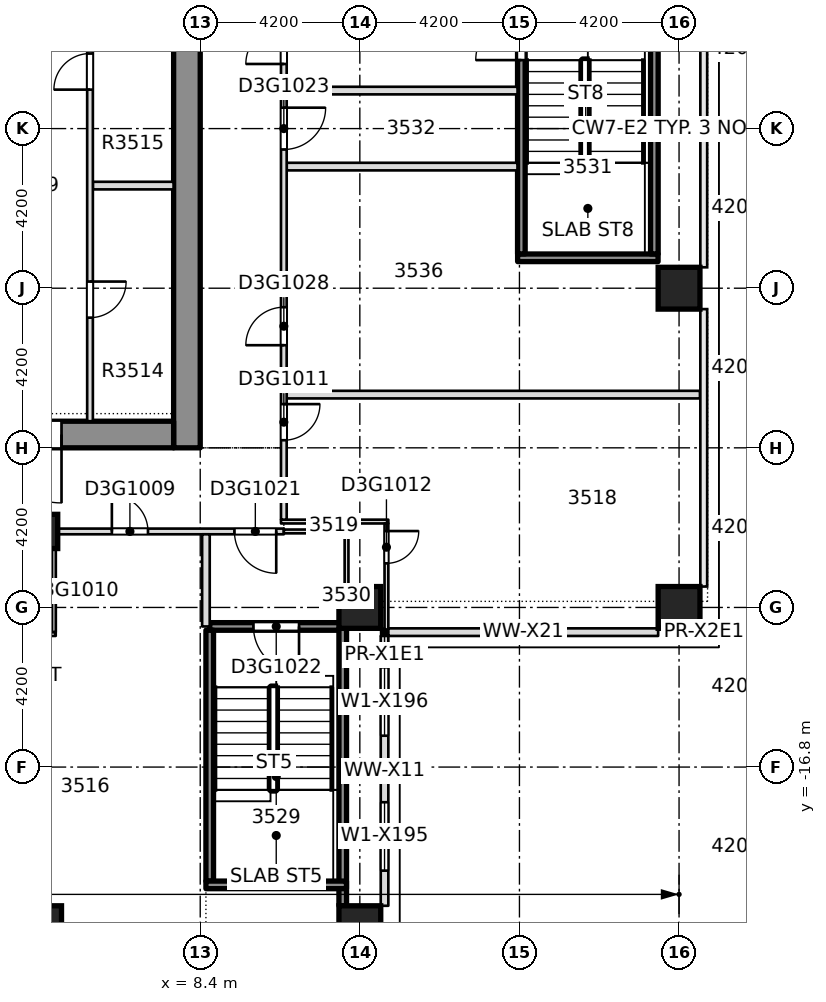
"""IFC4 building model, lengths in metres.
Left out: names, types, materials, properties, quantities, classifications, styles, units other than length and angle.
Written with IfcOpenShell. Run it as: python <this file> out.ifc"""

import sys

from ifc_helpers import new_model, si_unit, direction, frame, frame_2d, origin, origin_2d, place, context, subcontext, project, spatial, rectangle, extrude, element, fill, save


model = new_model("IFC4")
c1 = context("Model", 3, precision=1e-05, world=origin(), true_north=direction((0.0, 1.0)))
c2 = subcontext(c1, "Body", "Model", "MODEL_VIEW")
j1 = project(units=[si_unit("LENGTHUNIT", "METRE"), si_unit("PLANEANGLEUNIT", "RADIAN")], contexts=[c1])
p1 = place(None, origin())
s1 = spatial("IfcSite", under=j1, at=p1, CompositionType="ELEMENT")
p2 = place(p1, origin())
s2 = spatial("IfcBuilding", under=s1, at=p2, CompositionType="ELEMENT")
p3 = place(p2, frame((0.0, 0.0, 140.0)))
s3 = spatial("IfcBuildingStorey", under=s2, at=p3, CompositionType="ELEMENT", Elevation=140.0)
p4 = place(p3, frame((8.05, -8.4, -0.4), z_axis=(0.0, 0.0, 1.0), x_axis=(0.0, 1.0, 0.0)))
e1 = element("IfcWall", 1, at=p4, inside=s3, PredefinedType="SOLIDWALL", context=c2, shape_type="SweptSolid", body=[
    extrude(rectangle(XDim=30.15, YDim=0.7, at=frame_2d((15.075, 0.0))), origin(), (0.0, 0.0, 1.0), 3.45),
])
p5 = place(p4, frame((19.3, 0.0, 0.4)))
e2 = element("IfcOpeningElement", 2, at=p5, cuts=e1, PredefinedType="OPENING", context=c2, shape_type="SweptSolid", body=[
    extrude(rectangle(XDim=1.2, YDim=2.1, at=frame_2d((0.6, 1.05))), frame((0.0, 0.36, 0.0), z_axis=(0.0, -1.0, 0.0), x_axis=(1.0, 0.0, 0.0)), (0.0, 0.0, 1.0), 0.72),
])
p6 = place(p3, frame((-7.7, -8.05, -0.4), z_axis=(0.0, 0.0, 1.0), x_axis=(1.0, 0.0, 0.0)))
e3 = element("IfcWall", 3, at=p6, inside=s3, PredefinedType="SHEAR", context=c2, shape_type="SweptSolid", body=[
    extrude(rectangle(XDim=15.4, YDim=0.7, at=frame_2d((7.7, 0.0))), origin(), (0.0, 0.0, 1.0), 3.45),
])
p7 = place(p6, frame((2.95, 0.0, 0.4)))
e4 = element("IfcOpeningElement", 4, at=p7, cuts=e3, PredefinedType="OPENING", context=c2, shape_type="SweptSolid", body=[
    extrude(rectangle(XDim=1.8, YDim=2.1, at=frame_2d((0.9, 1.05))), frame((0.0, 0.36, 0.0), z_axis=(0.0, -1.0, 0.0), x_axis=(1.0, 0.0, 0.0)), (0.0, 0.0, 1.0), 0.72),
])
p8 = place(p6, frame((10.65, 0.0, 0.4)))
e5 = element("IfcOpeningElement", 5, at=p8, cuts=e3, PredefinedType="OPENING", context=c2, shape_type="SweptSolid", body=[
    extrude(rectangle(XDim=1.8, YDim=2.1, at=frame_2d((0.9, 1.05))), frame((0.0, 0.36, 0.0), z_axis=(0.0, -1.0, 0.0), x_axis=(1.0, 0.0, 0.0)), (0.0, 0.0, 1.0), 0.72),
])
for number, where, z_axis, x_axis in (
    (6, (4.2, -21.0, -0.4), (0.0, 0.0, 1.0), (1.0, 0.0, 0.0)),
    (7, (12.6, -21.0, -0.4), (0.0, 0.0, 1.0), (1.0, 0.0, 0.0)),
    (8, (12.6, -12.6, -0.4), (0.0, 0.0, 1.0), (1.0, 0.0, 0.0)),
    (9, (21.0, -12.6, -0.4), (0.0, 0.0, 1.0), (1.0, 0.0, 0.0)),
    (10, (21.0, -4.2, -0.4), (0.0, 0.0, 1.0), (1.0, 0.0, 0.0)),
):
    element("IfcColumn", number, at=place(p3, frame(where, z_axis=z_axis, x_axis=x_axis)), inside=s3, PredefinedType="COLUMN", context=c2, shape_type="SweptSolid", body=[
        extrude(rectangle(XDim=1.1, YDim=1.1, at=origin_2d()), origin(), (0.0, 0.0, 1.0), 3.45),
    ])
p9 = place(p3, frame((4.2, -10.6, -0.4), z_axis=(0.0, 0.0, 1.0), x_axis=(1.0, 0.0, 0.0)))
e11 = element("IfcColumn", 11, at=p9, inside=s3, PredefinedType="COLUMN", context=c2, shape_type="SweptSolid", body=[
    extrude(rectangle(XDim=0.9, YDim=0.9, at=origin_2d()), origin(), (0.0, 0.0, 1.0), 3.45),
])
p10 = place(p3, frame((1.802, -13.3, 0.0), z_axis=(0.0, 0.0, 1.0), x_axis=(1.0, 0.0, 0.0)))
e12 = element("IfcWall", 12, at=p10, inside=s3, PredefinedType="PARTITIONING", context=c2, shape_type="SweptSolid", body=[
    extrude(rectangle(XDim=2.796, YDim=0.1, at=frame_2d((1.398, 0.0))), origin(), (0.0, 0.0, 1.0), 3.05),
])
p11 = place(p10, frame((1.698, 0.0, 0.0)))
e13 = element("IfcOpeningElement", 13, at=p11, cuts=e12, PredefinedType="OPENING", context=c2, shape_type="SweptSolid", body=[
    extrude(rectangle(XDim=0.85, YDim=2.1, at=frame_2d((0.425, 1.05))), frame((0.0, 0.06, 0.0), z_axis=(0.0, -1.0, 0.0), x_axis=(1.0, 0.0, 0.0)), (0.0, 0.0, 1.0), 0.12),
])
p12 = place(p3, frame((8.65, -13.1, 0.0), z_axis=(0.0, 0.0, 1.0), x_axis=(1.0, 0.0, 0.0)))
e14 = element("IfcWall", 14, at=p12, inside=s3, PredefinedType="SOLIDWALL", context=c2, shape_type="SweptSolid", body=[
    extrude(rectangle(XDim=3.5, YDim=0.2, at=frame_2d((1.75, 0.0))), origin(), (0.0, 0.0, 1.0), 3.05),
])
p13 = place(p12, frame((1.15, 0.0, 0.0)))
e15 = element("IfcOpeningElement", 15, at=p13, cuts=e14, PredefinedType="OPENING", context=c2, shape_type="SweptSolid", body=[
    extrude(rectangle(XDim=1.2, YDim=2.1, at=frame_2d((0.6, 1.05))), frame((0.0, 0.11, 0.0), z_axis=(0.0, -1.0, 0.0), x_axis=(1.0, 0.0, 0.0)), (0.0, 0.0, 1.0), 0.22),
])
p14 = place(p3, frame((1.8, -10.6, 0.0), z_axis=(0.0, 0.0, 1.0), x_axis=(1.0, 0.0, 0.0)))
e16 = element("IfcWall", 16, at=p14, inside=s3, PredefinedType="PARTITIONING", context=c2, shape_type="SweptSolid", body=[
    extrude(rectangle(XDim=2.8, YDim=0.1, at=frame_2d((1.4, 0.0))), origin(), (0.0, 0.0, 1.0), 3.05),
])
p15 = place(p3, frame((4.5, -10.6, 0.0), z_axis=(0.0, 0.0, 1.0), x_axis=(1.0, 0.0, 0.0)))
e17 = element("IfcWall", 17, at=p15, inside=s3, PredefinedType="PARTITIONING", context=c2, shape_type="SweptSolid", body=[
    extrude(rectangle(XDim=6.1, YDim=0.15, at=frame_2d((3.05, 0.0))), origin(), (0.0, 0.0, 1.0), 3.05),
])
p16 = place(p15, frame((1.575, 0.0, 0.0)))
e18 = element("IfcOpeningElement", 18, at=p16, cuts=e17, PredefinedType="OPENING", context=c2, shape_type="SweptSolid", body=[
    extrude(rectangle(XDim=0.95, YDim=2.1, at=frame_2d((0.475, 1.05))), frame((0.0, 0.085, 0.0), z_axis=(0.0, -1.0, 0.0), x_axis=(1.0, 0.0, 0.0)), (0.0, 0.0, 1.0), 0.17),
])
p17 = place(p15, frame((4.8, 0.0, 0.0)))
e19 = element("IfcOpeningElement", 19, at=p17, cuts=e17, PredefinedType="OPENING", context=c2, shape_type="SweptSolid", body=[
    extrude(rectangle(XDim=1.1, YDim=2.1, at=frame_2d((0.55, 1.05))), frame((0.0, 0.085, 0.0), z_axis=(0.0, -1.0, 0.0), x_axis=(1.0, 0.0, 0.0)), (0.0, 0.0, 1.0), 0.17),
])
p18 = place(p3, frame((10.6, -10.6, 0.0), z_axis=(0.0, 0.0, 1.0), x_axis=(1.0, 0.0, 0.0)))
e20 = element("IfcWall", 20, at=p18, inside=s3, PredefinedType="PARTITIONING", context=c2, shape_type="SweptSolid", body=[
    extrude(rectangle(XDim=1.7, YDim=0.1, at=frame_2d((0.85, 0.0))), origin(), (0.0, 0.0, 1.0), 3.05),
])
p19 = place(p3, frame((10.525, -10.34, 0.0), z_axis=(0.0, 0.0, 1.0), x_axis=(1.0, 0.0, 0.0)))
e21 = element("IfcWall", 21, at=p19, inside=s3, PredefinedType="PARTITIONING", context=c2, shape_type="SweptSolid", body=[
    extrude(rectangle(XDim=2.825, YDim=0.1, at=frame_2d((1.413, 0.0))), origin(), (0.0, 0.0, 1.0), 3.05),
])
p20 = place(p3, frame((10.675, -7.0, 0.0), z_axis=(0.0, 0.0, 1.0), x_axis=(1.0, 0.0, 0.0)))
e22 = element("IfcWall", 22, at=p20, inside=s3, PredefinedType="PARTITIONING", context=c2, shape_type="SweptSolid", body=[
    extrude(rectangle(XDim=10.875, YDim=0.2, at=frame_2d((5.438, 0.0))), origin(), (0.0, 0.0, 1.0), 3.05),
])
p21 = place(p3, frame((16.752, -3.4, 0.0), z_axis=(0.0, 0.0, 1.0), x_axis=(1.0, 0.0, 0.0)))
e23 = element("IfcWall", 23, at=p21, inside=s3, PredefinedType="SOLIDWALL", context=c2, shape_type="SweptSolid", body=[
    extrude(rectangle(XDim=3.696, YDim=0.2, at=frame_2d((1.848, 0.0))), origin(), (0.0, 0.0, 1.0), 3.05),
])
p22 = place(p3, frame((10.677, -1.0, 0.0), z_axis=(0.0, 0.0, 1.0), x_axis=(1.0, 0.0, 0.0)))
e24 = element("IfcWall", 24, at=p22, inside=s3, PredefinedType="PARTITIONING", context=c2, shape_type="SweptSolid", body=[
    extrude(rectangle(XDim=6.071, YDim=0.2, at=frame_2d((3.036, 0.0))), origin(), (0.0, 0.0, 1.0), 3.05),
])
p23 = place(p3, frame((10.675, 1.0, 0.0), z_axis=(0.0, 0.0, 1.0), x_axis=(1.0, 0.0, 0.0)))
e25 = element("IfcWall", 25, at=p23, inside=s3, PredefinedType="PARTITIONING", context=c2, shape_type="SweptSolid", body=[
    extrude(rectangle(XDim=6.075, YDim=0.2, at=frame_2d((3.038, 0.0))), origin(), (0.0, 0.0, 1.0), 3.05),
])
p24 = place(p3, frame((4.55, -13.248, 0.0), z_axis=(0.0, 0.0, 1.0), x_axis=(0.0, 1.0, 0.0)))
e26 = element("IfcWall", 26, at=p24, inside=s3, PredefinedType="PARTITIONING", context=c2, shape_type="SweptSolid", body=[
    extrude(rectangle(XDim=2.573, YDim=0.1, at=frame_2d((1.287, 0.0))), origin(), (0.0, 0.0, 1.0), 3.05),
])
p25 = place(p3, frame((8.55, -13.1, 0.0), z_axis=(0.0, 0.0, 1.0), x_axis=(0.0, 1.0, 0.0)))
e27 = element("IfcWall", 27, at=p25, inside=s3, PredefinedType="PARTITIONING", context=c2, shape_type="SweptSolid", body=[
    extrude(rectangle(XDim=2.425, YDim=0.2, at=frame_2d((1.212, 0.0))), origin(), (0.0, 0.0, 1.0), 3.05),
])
p26 = place(p3, frame((10.6, -10.29, 0.0), z_axis=(0.0, 0.0, 1.0), x_axis=(0.0, 1.0, 0.0)))
e28 = element("IfcWall", 28, at=p26, inside=s3, PredefinedType="PARTITIONING", context=c2, shape_type="SweptSolid", body=[
    extrude(rectangle(XDim=13.64, YDim=0.15, at=frame_2d((6.82, 0.0))), origin(), (0.0, 0.0, 1.0), 3.05),
])
p27 = place(p26, frame((2.09, 0.0, 0.0)))
e29 = element("IfcOpeningElement", 29, at=p27, cuts=e28, PredefinedType="OPENING", context=c2, shape_type="SweptSolid", body=[
    extrude(rectangle(XDim=0.95, YDim=2.1, at=frame_2d((0.475, 1.05))), frame((0.0, 0.085, 0.0), z_axis=(0.0, -1.0, 0.0), x_axis=(1.0, 0.0, 0.0)), (0.0, 0.0, 1.0), 0.17),
])
p28 = place(p26, frame((9.74, 0.0, 0.0)))
e30 = element("IfcOpeningElement", 30, at=p28, cuts=e28, PredefinedType="OPENING", context=c2, shape_type="SweptSolid", body=[
    extrude(rectangle(XDim=1.1, YDim=2.1, at=frame_2d((0.55, 1.05))), frame((0.0, 0.085, 0.0), z_axis=(0.0, -1.0, 0.0), x_axis=(1.0, 0.0, 0.0)), (0.0, 0.0, 1.0), 0.17),
])
p29 = place(p26, frame((4.59, 0.0, 0.0)))
e31 = element("IfcOpeningElement", 31, at=p29, cuts=e28, PredefinedType="OPENING", context=c2, shape_type="SweptSolid", body=[
    extrude(rectangle(XDim=1.0, YDim=2.1, at=frame_2d((0.5, 1.05))), frame((0.0, 0.085, 0.0), z_axis=(0.0, -1.0, 0.0), x_axis=(1.0, 0.0, 0.0)), (0.0, 0.0, 1.0), 0.17),
])
p30 = place(p26, frame((11.99, 0.0, 0.0)))
e32 = element("IfcOpeningElement", 32, at=p30, cuts=e28, PredefinedType="OPENING", context=c2, shape_type="SweptSolid", body=[
    extrude(rectangle(XDim=1.0, YDim=2.1, at=frame_2d((0.5, 1.05))), frame((0.0, 0.085, 0.0), z_axis=(0.0, -1.0, 0.0), x_axis=(1.0, 0.0, 0.0)), (0.0, 0.0, 1.0), 0.17),
])
p31 = place(p3, frame((12.25, -12.44, 0.0), z_axis=(0.0, 0.0, 1.0), x_axis=(0.0, 1.0, 0.0)))
e33 = element("IfcWall", 33, at=p31, inside=s3, PredefinedType="PARTITIONING", context=c2, shape_type="SweptSolid", body=[
    extrude(rectangle(XDim=1.79, YDim=0.1, at=frame_2d((0.895, 0.0))), origin(), (0.0, 0.0, 1.0), 3.05),
])
p32 = place(p3, frame((13.3, -13.35, 0.0), z_axis=(0.0, 0.0, 1.0), x_axis=(0.0, 1.0, 0.0)))
e34 = element("IfcWall", 34, at=p32, inside=s3, PredefinedType="PARTITIONING", context=c2, shape_type="SweptSolid", body=[
    extrude(rectangle(XDim=2.96, YDim=0.1, at=frame_2d((1.48, 0.0))), origin(), (0.0, 0.0, 1.0), 3.05),
])
p33 = place(p32, frame((1.91, 0.0, 0.0)))
e35 = element("IfcOpeningElement", 35, at=p33, cuts=e34, PredefinedType="OPENING", context=c2, shape_type="SweptSolid", body=[
    extrude(rectangle(XDim=0.85, YDim=2.1, at=frame_2d((0.425, 1.05))), frame((0.0, 0.06, 0.0), z_axis=(0.0, -1.0, 0.0), x_axis=(1.0, 0.0, 0.0)), (0.0, 0.0, 1.0), 0.12),
])
p34 = place(p3, frame((16.85, -3.298, 0.0), z_axis=(0.0, 0.0, 1.0), x_axis=(0.0, 1.0, 0.0)))
e36 = element("IfcWall", 36, at=p34, inside=s3, PredefinedType="SOLIDWALL", context=c2, shape_type="SweptSolid", body=[
    extrude(rectangle(XDim=6.598, YDim=0.2, at=frame_2d((3.299, 0.0))), origin(), (0.0, 0.0, 1.0), 3.05),
])
p35 = place(p34, frame((5.1, 0.0, 0.0)))
e37 = element("IfcOpeningElement", 37, at=p35, cuts=e36, PredefinedType="OPENING", context=c2, shape_type="SweptSolid", body=[
    extrude(rectangle(XDim=1.2, YDim=2.1, at=frame_2d((0.6, 1.05))), frame((0.0, 0.11, 0.0), z_axis=(0.0, -1.0, 0.0), x_axis=(1.0, 0.0, 0.0)), (0.0, 0.0, 1.0), 0.22),
])
p36 = place(p3, frame((20.35, -3.298, 0.0), z_axis=(0.0, 0.0, 1.0), x_axis=(0.0, 1.0, 0.0)))
e38 = element("IfcWall", 38, at=p36, inside=s3, PredefinedType="SOLIDWALL", context=c2, shape_type="SweptSolid", body=[
    extrude(rectangle(XDim=6.596, YDim=0.2, at=frame_2d((3.298, 0.0))), origin(), (0.0, 0.0, 1.0), 3.05),
])
p37 = place(p3, frame((13.25, -20.45, 0.0), z_axis=(0.0, 0.0, 1.0), x_axis=(0.0, 1.0, 0.0)))
e39 = element("IfcWall", 39, at=p37, inside=s3, PredefinedType="STANDARD", context=c2, shape_type="SweptSolid", body=[
    extrude(rectangle(XDim=7.1, YDim=0.2, at=frame_2d((3.55, 0.0))), origin(), (0.0, 0.0, 1.0), 3.05),
])
p38 = place(p37, frame((0.925, 0.0, 0.2)))
e40 = element("IfcOpeningElement", 40, at=p38, cuts=e39, PredefinedType="OPENING", context=c2, shape_type="SweptSolid", body=[
    extrude(rectangle(XDim=1.8, YDim=2.65, at=frame_2d((0.9, 1.325))), frame((0.0, 0.11, 0.0), z_axis=(0.0, -1.0, 0.0), x_axis=(1.0, 0.0, 0.0)), (0.0, 0.0, 1.0), 0.22),
])
p39 = place(p37, frame((4.475, 0.0, 0.2)))
e41 = element("IfcOpeningElement", 41, at=p39, cuts=e39, PredefinedType="OPENING", context=c2, shape_type="SweptSolid", body=[
    extrude(rectangle(XDim=1.8, YDim=2.65, at=frame_2d((0.9, 1.325))), frame((0.0, 0.11, 0.0), z_axis=(0.0, -1.0, 0.0), x_axis=(1.0, 0.0, 0.0)), (0.0, 0.0, 1.0), 0.22),
])
p40 = place(p3, frame((13.35, -13.25, 0.0), z_axis=(0.0, 0.0, 1.0), x_axis=(1.0, 0.0, 0.0)))
e42 = element("IfcWall", 42, at=p40, inside=s3, PredefinedType="STANDARD", context=c2, shape_type="SweptSolid", body=[
    extrude(rectangle(XDim=7.1, YDim=0.2, at=frame_2d((3.55, 0.0))), origin(), (0.0, 0.0, 1.0), 3.05),
])
p41 = place(p3, frame((5.575, -1.5, 0.0), z_axis=(0.0, 0.0, 1.0), x_axis=(1.0, 0.0, 0.0)))
e43 = element("IfcWall", 43, at=p41, inside=s3, PredefinedType="PARTITIONING", context=c2, shape_type="SweptSolid", body=[
    extrude(rectangle(XDim=2.124, YDim=0.2, at=frame_2d((1.062, 0.0))), origin(), (0.0, 0.0, 1.0), 3.05),
])
p42 = place(p3, frame((5.5, -7.699, 0.0), z_axis=(0.0, 0.0, 1.0), x_axis=(0.0, 1.0, 0.0)))
e44 = element("IfcWall", 44, at=p42, inside=s3, PredefinedType="PARTITIONING", context=c2, shape_type="SweptSolid", body=[
    extrude(rectangle(XDim=12.124, YDim=0.15, at=frame_2d((6.062, 0.0))), origin(), (0.0, 0.0, 1.0), 3.05),
])
p43 = place(p42, frame((2.724, 0.0, 0.0)))
e45 = element("IfcOpeningElement", 45, at=p43, cuts=e44, PredefinedType="OPENING", context=c2, shape_type="SweptSolid", body=[
    extrude(rectangle(XDim=0.95, YDim=2.1, at=frame_2d((0.475, 1.05))), frame((0.0, 0.085, 0.0), z_axis=(0.0, -1.0, 0.0), x_axis=(1.0, 0.0, 0.0)), (0.0, 0.0, 1.0), 0.17),
])
p44 = place(p42, frame((8.724, 0.0, 0.0)))
e46 = element("IfcOpeningElement", 46, at=p44, cuts=e44, PredefinedType="OPENING", context=c2, shape_type="SweptSolid", body=[
    extrude(rectangle(XDim=0.95, YDim=2.1, at=frame_2d((0.475, 1.05))), frame((0.0, 0.085, 0.0), z_axis=(0.0, -1.0, 0.0), x_axis=(1.0, 0.0, 0.0)), (0.0, 0.0, 1.0), 0.17),
])
p45 = place(p3, frame((8.65, -19.8, 0.0), z_axis=(0.0, 0.0, 1.0), x_axis=(0.0, 1.0, 0.0)))
e47 = element("IfcWall", 47, at=p45, inside=s3, PredefinedType="SOLIDWALL", context=c2, shape_type="SweptSolid", body=[
    extrude(rectangle(XDim=6.6, YDim=0.2, at=frame_2d((3.3, 0.0))), origin(), (0.0, 0.0, 1.0), 3.05),
])
p46 = place(p3, frame((12.15, -20.45, 0.0), z_axis=(0.0, 0.0, 1.0), x_axis=(0.0, 1.0, 0.0)))
e48 = element("IfcWall", 48, at=p46, inside=s3, PredefinedType="SOLIDWALL", context=c2, shape_type="SweptSolid", body=[
    extrude(rectangle(XDim=7.3, YDim=0.2, at=frame_2d((3.65, 0.0))), origin(), (0.0, 0.0, 1.0), 3.05),
])
p47 = place(p3, frame((8.55, -19.9, 0.0), z_axis=(0.0, 0.0, 1.0), x_axis=(1.0, 0.0, 0.0)))
e49 = element("IfcWall", 49, at=p47, inside=s3, PredefinedType="SOLIDWALL", context=c2, shape_type="SweptSolid", body=[
    extrude(rectangle(XDim=3.698, YDim=0.2, at=frame_2d((1.849, 0.0))), origin(), (0.0, 0.0, 1.0), 3.05),
])
p48 = place(p16, origin())
e50 = element("IfcDoor", 50, at=p48, inside=s3, OperationType="SINGLE_SWING_LEFT", PredefinedType="DOOR", context=c2, shape_type="SweptSolid", body=[
    extrude(rectangle(XDim=0.95, YDim=2.1, at=frame_2d((0.475, 1.05))), frame((0.0, 0.025, 0.0), z_axis=(0.0, -1.0, 0.0), x_axis=(1.0, 0.0, 0.0)), (0.0, 0.0, 1.0), 0.05),
])
fill(e18, e50)
p49 = place(p27, origin())
e51 = element("IfcDoor", 51, at=p49, inside=s3, OperationType="SINGLE_SWING_LEFT", PredefinedType="DOOR", context=c2, shape_type="SweptSolid", body=[
    extrude(rectangle(XDim=0.95, YDim=2.1, at=frame_2d((0.475, 1.05))), frame((0.0, 0.025, 0.0), z_axis=(0.0, -1.0, 0.0), x_axis=(1.0, 0.0, 0.0)), (0.0, 0.0, 1.0), 0.05),
])
fill(e29, e51)
p50 = place(p33, origin())
e52 = element("IfcDoor", 52, at=p50, inside=s3, OperationType="SINGLE_SWING_LEFT", PredefinedType="DOOR", context=c2, shape_type="SweptSolid", body=[
    extrude(rectangle(XDim=0.85, YDim=2.1, at=frame_2d((0.425, 1.05))), frame((0.0, 0.025, 0.0), z_axis=(0.0, -1.0, 0.0), x_axis=(1.0, 0.0, 0.0)), (0.0, 0.0, 1.0), 0.05),
])
fill(e35, e52)
p51 = place(p17, origin())
e53 = element("IfcDoor", 53, at=p51, inside=s3, OperationType="SINGLE_SWING_RIGHT", PredefinedType="DOOR", context=c2, shape_type="SweptSolid", body=[
    extrude(rectangle(XDim=1.1, YDim=2.1, at=frame_2d((0.55, 1.05))), frame((0.0, 0.025, 0.0), z_axis=(0.0, -1.0, 0.0), x_axis=(1.0, 0.0, 0.0)), (0.0, 0.0, 1.0), 0.05),
])
fill(e19, e53)
p52 = place(p13, origin())
e54 = element("IfcDoor", 54, at=p52, inside=s3, OperationType="SINGLE_SWING_RIGHT", PredefinedType="DOOR", context=c2, shape_type="SweptSolid", body=[
    extrude(rectangle(XDim=1.2, YDim=2.1, at=frame_2d((0.6, 1.05))), frame((0.0, 0.025, 0.0), z_axis=(0.0, -1.0, 0.0), x_axis=(1.0, 0.0, 0.0)), (0.0, 0.0, 1.0), 0.05),
])
fill(e15, e54)
p53 = place(p28, origin())
e55 = element("IfcDoor", 55, at=p53, inside=s3, OperationType="SINGLE_SWING_LEFT", PredefinedType="DOOR", context=c2, shape_type="SweptSolid", body=[
    extrude(rectangle(XDim=1.1, YDim=2.1, at=frame_2d((0.55, 1.05))), frame((0.0, 0.025, 0.0), z_axis=(0.0, -1.0, 0.0), x_axis=(1.0, 0.0, 0.0)), (0.0, 0.0, 1.0), 0.05),
])
fill(e30, e55)
p54 = place(p35, origin())
e56 = element("IfcDoor", 56, at=p54, inside=s3, OperationType="SINGLE_SWING_LEFT", PredefinedType="DOOR", context=c2, shape_type="SweptSolid", body=[
    extrude(rectangle(XDim=1.2, YDim=2.1, at=frame_2d((0.6, 1.05))), frame((0.0, 0.025, 0.0), z_axis=(0.0, -1.0, 0.0), x_axis=(1.0, 0.0, 0.0)), (0.0, 0.0, 1.0), 0.05),
])
fill(e37, e56)
p55 = place(p29, origin())
e57 = element("IfcDoor", 57, at=p55, inside=s3, OperationType="SINGLE_SWING_RIGHT", PredefinedType="DOOR", context=c2, shape_type="SweptSolid", body=[
    extrude(rectangle(XDim=1.0, YDim=2.1, at=frame_2d((0.5, 1.05))), frame((0.0, 0.025, 0.0), z_axis=(0.0, -1.0, 0.0), x_axis=(1.0, 0.0, 0.0)), (0.0, 0.0, 1.0), 0.05),
])
fill(e31, e57)
p56 = place(p30, origin())
e58 = element("IfcDoor", 58, at=p56, inside=s3, OperationType="SINGLE_SWING_LEFT", PredefinedType="DOOR", context=c2, shape_type="SweptSolid", body=[
    extrude(rectangle(XDim=1.0, YDim=2.1, at=frame_2d((0.5, 1.05))), frame((0.0, 0.025, 0.0), z_axis=(0.0, -1.0, 0.0), x_axis=(1.0, 0.0, 0.0)), (0.0, 0.0, 1.0), 0.05),
])
fill(e32, e58)
p57 = place(p38, origin())
e59 = element("IfcWindow", 59, at=p57, inside=s3, PartitioningType="SINGLE_PANEL", PredefinedType="WINDOW", context=c2, shape_type="SweptSolid", body=[
    extrude(rectangle(XDim=1.8, YDim=2.65, at=frame_2d((0.9, 1.325))), frame((0.0, 0.03, 0.0), z_axis=(0.0, -1.0, 0.0), x_axis=(1.0, 0.0, 0.0)), (0.0, 0.0, 1.0), 0.06),
])
fill(e40, e59)
p58 = place(p39, origin())
e60 = element("IfcWindow", 60, at=p58, inside=s3, PartitioningType="SINGLE_PANEL", PredefinedType="WINDOW", context=c2, shape_type="SweptSolid", body=[
    extrude(rectangle(XDim=1.8, YDim=2.65, at=frame_2d((0.9, 1.325))), frame((0.0, 0.03, 0.0), z_axis=(0.0, -1.0, 0.0), x_axis=(1.0, 0.0, 0.0)), (0.0, 0.0, 1.0), 0.06),
])
fill(e41, e60)
p59 = place(p43, origin())
e61 = element("IfcDoor", 61, at=p59, inside=s3, OperationType="SINGLE_SWING_LEFT", PredefinedType="DOOR", context=c2, shape_type="SweptSolid", body=[
    extrude(rectangle(XDim=0.95, YDim=2.1, at=frame_2d((0.475, 1.05))), frame((0.0, 0.025, 0.0), z_axis=(0.0, -1.0, 0.0), x_axis=(1.0, 0.0, 0.0)), (0.0, 0.0, 1.0), 0.05),
])
fill(e45, e61)
p60 = place(p44, origin())
e62 = element("IfcDoor", 62, at=p60, inside=s3, OperationType="SINGLE_SWING_LEFT", PredefinedType="DOOR", context=c2, shape_type="SweptSolid", body=[
    extrude(rectangle(XDim=0.95, YDim=2.1, at=frame_2d((0.475, 1.05))), frame((0.0, 0.025, 0.0), z_axis=(0.0, -1.0, 0.0), x_axis=(1.0, 0.0, 0.0)), (0.0, 0.0, 1.0), 0.05),
])
fill(e46, e62)
p61 = place(p8, origin())
e63 = element("IfcDoor", 63, at=p61, inside=s3, OperationType="SINGLE_SWING_LEFT", PredefinedType="DOOR", context=c2, shape_type="SweptSolid", body=[
    extrude(rectangle(XDim=1.8, YDim=2.1, at=frame_2d((0.9, 1.05))), frame((0.0, 0.025, 0.0), z_axis=(0.0, -1.0, 0.0), x_axis=(1.0, 0.0, 0.0)), (0.0, 0.0, 1.0), 0.05),
])
fill(e5, e63)
save(model, sys.argv[1])
